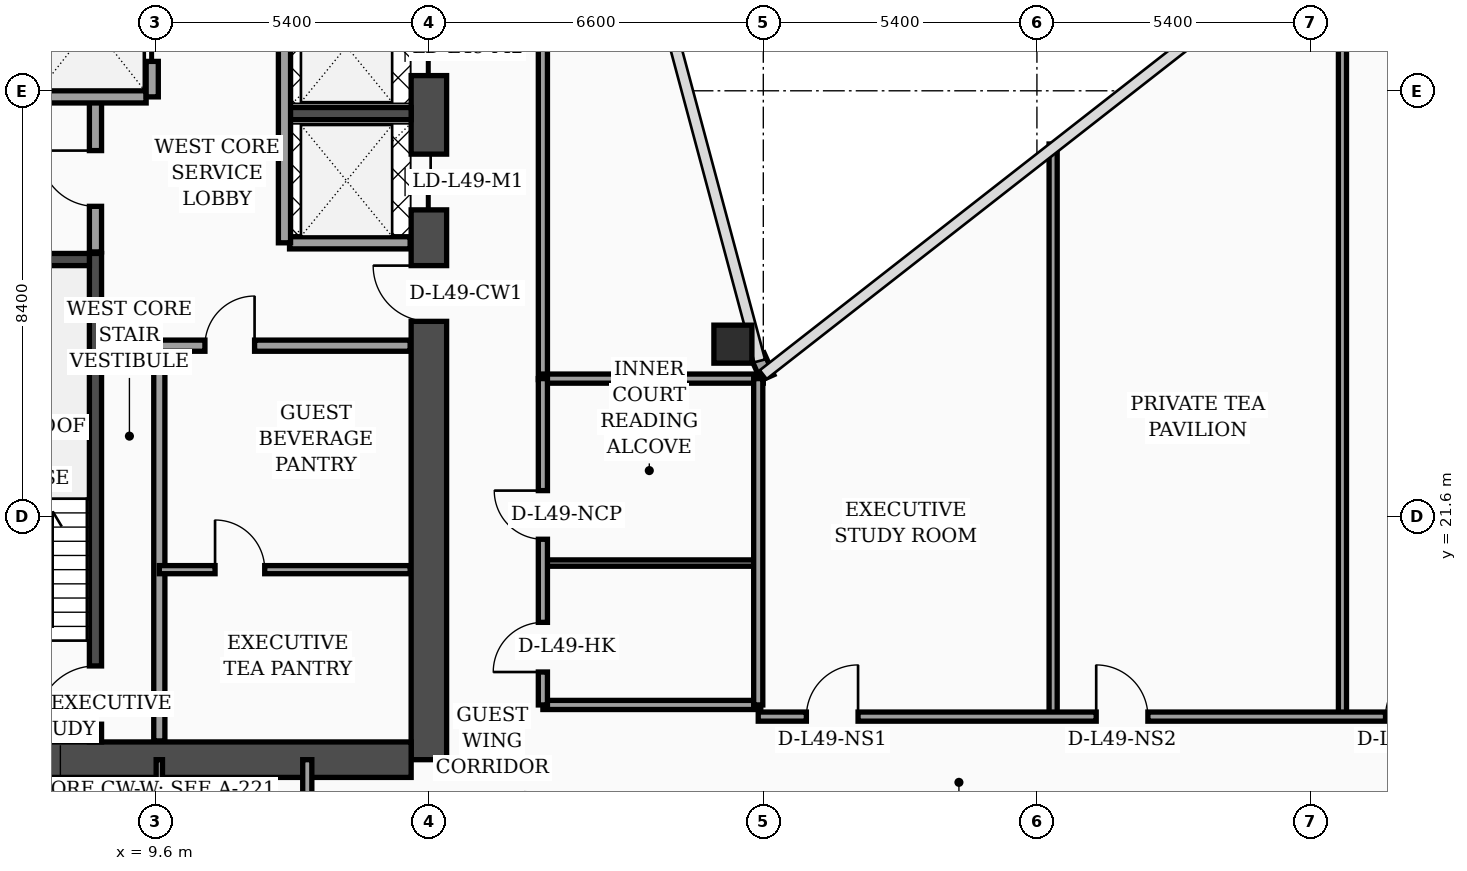
"""IFC4 building model, lengths in metres.
Left out: names, types, materials, properties, quantities, classifications, styles, units other than length and angle.
Written with IfcOpenShell. Run it as: python <this file> out.ifc"""

import sys

from ifc_helpers import new_model, si_unit, direction, frame, frame_2d, origin, origin_2d, place, context, subcontext, project, spatial, rectangle, hollow_rectangle, extrude, element, fill, save


model = new_model("IFC4")
c1 = context("Model", 3, precision=1e-05, world=origin(), true_north=direction((0.0, 1.0)))
c2 = subcontext(c1, "Body", "Model", "MODEL_VIEW")
j1 = project(units=[si_unit("LENGTHUNIT", "METRE"), si_unit("PLANEANGLEUNIT", "RADIAN")], contexts=[c1])
p1 = place(None, origin())
s1 = spatial("IfcSite", under=j1, at=p1, CompositionType="ELEMENT")
p2 = place(p1, origin())
s2 = spatial("IfcBuilding", under=s1, at=p2, CompositionType="ELEMENT")
p3 = place(p2, frame((0.0, 0.0, 199.6)))
s3 = spatial("IfcBuildingStorey", under=s2, at=p3, CompositionType="ELEMENT", Elevation=199.6)
p4 = place(p3, frame((15.0, 16.8, 0.0), z_axis=(0.0, 0.0, 1.0), x_axis=(0.0, 1.0, 0.0)))
e1 = element("IfcWall", 1, at=p4, inside=s3, PredefinedType="SHEAR", context=c2, shape_type="SweptSolid", body=[
    extrude(rectangle(XDim=21.6, YDim=0.7, at=frame_2d((10.8, 0.0))), origin(), (0.0, 0.0, 1.0), 3.56),
])
p5 = place(p4, frame((8.65, 0.0, 0.0)))
e2 = element("IfcOpeningElement", 2, at=p5, cuts=e1, PredefinedType="OPENING", context=c2, shape_type="SweptSolid", body=[
    extrude(rectangle(XDim=1.1, YDim=2.2, at=frame_2d((0.55, 1.1))), frame((0.0, 0.36, 0.0), z_axis=(0.0, -1.0, 0.0), x_axis=(1.0, 0.0, 0.0)), (0.0, 0.0, 1.0), 0.72),
])
p6 = place(p4, frame((10.85, 0.0, 0.0)))
e3 = element("IfcOpeningElement", 3, at=p6, cuts=e1, PredefinedType="OPENING", context=c2, shape_type="SweptSolid", body=[
    extrude(rectangle(XDim=1.1, YDim=2.2, at=frame_2d((0.55, 1.1))), frame((0.0, 0.36, 0.0), z_axis=(0.0, -1.0, 0.0), x_axis=(1.0, 0.0, 0.0)), (0.0, 0.0, 1.0), 0.72),
])
p7 = place(p4, frame((13.5, 0.0, 0.0)))
e4 = element("IfcOpeningElement", 4, at=p7, cuts=e1, PredefinedType="OPENING", context=c2, shape_type="SweptSolid", body=[
    extrude(rectangle(XDim=1.1, YDim=2.2, at=frame_2d((0.55, 1.1))), frame((0.0, 0.36, 0.0), z_axis=(0.0, -1.0, 0.0), x_axis=(1.0, 0.0, 0.0)), (0.0, 0.0, 1.0), 0.72),
])
p8 = place(p4, frame((16.15, 0.0, 0.0)))
e5 = element("IfcOpeningElement", 5, at=p8, cuts=e1, PredefinedType="OPENING", context=c2, shape_type="SweptSolid", body=[
    extrude(rectangle(XDim=1.1, YDim=2.2, at=frame_2d((0.55, 1.1))), frame((0.0, 0.36, 0.0), z_axis=(0.0, -1.0, 0.0), x_axis=(1.0, 0.0, 0.0)), (0.0, 0.0, 1.0), 0.72),
])
p9 = place(p3, frame((4.55, 16.8, 0.0), z_axis=(0.0, 0.0, 1.0), x_axis=(1.0, 0.0, 0.0)))
e6 = element("IfcWall", 6, at=p9, inside=s3, PredefinedType="SHEAR", context=c2, shape_type="SweptSolid", body=[
    extrude(rectangle(XDim=10.1, YDim=0.7, at=frame_2d((5.05, 0.0))), origin(), (0.0, 0.0, 1.0), 3.56),
])
p10 = place(p3, frame((8.42, 17.15, 0.0), z_axis=(0.0, 0.0, 1.0), x_axis=(0.0, 1.0, 0.0)))
e7 = element("IfcWall", 7, at=p10, inside=s3, PredefinedType="SOLIDWALL", context=c2, shape_type="SweptSolid", body=[
    extrude(rectangle(XDim=9.64, YDim=0.24, at=frame_2d((4.82, 0.0))), origin(), (0.0, 0.0, 1.0), 3.56),
])
p11 = place(p10, frame((0.35, 0.0, 0.0)))
e8 = element("IfcOpeningElement", 8, at=p11, cuts=e7, PredefinedType="OPENING", context=c2, shape_type="SweptSolid", body=[
    extrude(rectangle(XDim=1.15, YDim=2.2, at=frame_2d((0.575, 1.1))), frame((0.0, 0.13, 0.0), z_axis=(0.0, -1.0, 0.0), x_axis=(1.0, 0.0, 0.0)), (0.0, 0.0, 1.0), 0.26),
])
for number, where, z_axis, x_axis in (
    (9, (5.2, 17.58, 0.0), (0.0, 0.0, 1.0), (1.0, 0.0, 0.0)),
    (10, (5.2, 26.67, 0.0), (0.0, 0.0, 1.0), (1.0, 0.0, 0.0)),
):
    element("IfcWall", number, at=place(p3, frame(where, z_axis=z_axis, x_axis=x_axis)), inside=s3, PredefinedType="SOLIDWALL", context=c2, shape_type="SweptSolid", body=[
        extrude(rectangle(XDim=3.1, YDim=0.24, at=frame_2d((1.55, 0.0))), origin(), (0.0, 0.0, 1.0), 3.56),
    ])
p12 = place(p3, frame((12.18, 29.55, 0.0), z_axis=(0.0, 0.0, 1.0), x_axis=(1.0, 0.0, 0.0)))
e11 = element("IfcWall", 11, at=p12, inside=s3, PredefinedType="SOLIDWALL", context=c2, shape_type="SweptSolid", body=[
    extrude(rectangle(XDim=2.47, YDim=0.24, at=frame_2d((1.235, 0.0))), origin(), (0.0, 0.0, 1.0), 3.56),
])
p13 = place(p3, frame((21.0, 25.0, 0.0), z_axis=(0.0, 0.0, 1.0), x_axis=(1.0, 0.0, 0.0)))
e12 = element("IfcColumn", 12, at=p13, inside=s3, PredefinedType="COLUMN", context=c2, shape_type="SweptSolid", body=[
    extrude(hollow_rectangle(XDim=0.75, YDim=0.75, WallThickness=0.032, at=origin_2d()), origin(), (0.0, 0.0, 1.0), 3.56),
])
p14 = place(p3, frame((21.68, 24.34, 0.0), z_axis=(0.0, 0.0, 1.0), x_axis=(-0.40758134973, 0.913168901875, 0.0)))
e13 = element("IfcWall", 13, at=p14, inside=s3, PredefinedType="SOLIDWALL", context=c2, shape_type="SweptSolid", body=[
    extrude(rectangle(XDim=0.471, YDim=0.28, at=frame_2d((0.235, 0.0))), origin(), (0.0, 0.0, 1.0), 3.56),
])
p15 = place(p3, frame((8.42, 26.82, 0.0), z_axis=(0.0, 0.0, 1.0), x_axis=(0.0, 1.0, 0.0)))
e14 = element("IfcWall", 14, at=p15, inside=s3, PredefinedType="SOLIDWALL", context=c2, shape_type="SweptSolid", body=[
    extrude(rectangle(XDim=3.0, YDim=0.24, at=frame_2d((1.5, 0.0))), origin(), (0.0, 0.0, 1.0), 3.56),
])
p16 = place(p15, frame((0.9, 0.0, 0.0)))
e15 = element("IfcOpeningElement", 15, at=p16, cuts=e14, PredefinedType="OPENING", context=c2, shape_type="SweptSolid", body=[
    extrude(rectangle(XDim=1.1, YDim=2.2, at=frame_2d((0.55, 1.1))), frame((0.0, 0.13, 0.0), z_axis=(0.0, -1.0, 0.0), x_axis=(1.0, 0.0, 0.0)), (0.0, 0.0, 1.0), 0.26),
])
p17 = place(p3, frame((4.57, 29.88, 0.0), z_axis=(0.0, 0.0, 1.0), x_axis=(1.0, 0.0, 0.0)))
e16 = element("IfcWall", 16, at=p17, inside=s3, PredefinedType="SOLIDWALL", context=c2, shape_type="SweptSolid", body=[
    extrude(rectangle(XDim=4.85, YDim=0.24, at=frame_2d((2.425, 0.0))), origin(), (0.0, 0.0, 1.0), 3.56),
])
p18 = place(p17, frame((0.45, 0.0, 0.0)))
e17 = element("IfcOpeningElement", 17, at=p18, cuts=e16, PredefinedType="OPENING", context=c2, shape_type="SweptSolid", body=[
    extrude(rectangle(XDim=1.3, YDim=2.35, at=frame_2d((0.65, 1.175))), frame((0.0, 0.13, 0.0), z_axis=(0.0, -1.0, 0.0), x_axis=(1.0, 0.0, 0.0)), (0.0, 0.0, 1.0), 0.26),
])
p19 = place(p3, frame((9.54, 29.88, 0.0), z_axis=(0.0, 0.0, 1.0), x_axis=(0.0, 1.0, 0.0)))
e18 = element("IfcWall", 18, at=p19, inside=s3, PredefinedType="SOLIDWALL", context=c2, shape_type="SweptSolid", body=[
    extrude(rectangle(XDim=2.9, YDim=0.24, at=frame_2d((1.45, 0.0))), origin(), (0.0, 0.0, 1.0), 3.56),
])
p20 = place(p19, frame((0.7, 0.0, 0.0)))
e19 = element("IfcOpeningElement", 19, at=p20, cuts=e18, PredefinedType="OPENING", context=c2, shape_type="SweptSolid", body=[
    extrude(rectangle(XDim=1.3, YDim=2.35, at=frame_2d((0.65, 1.175))), frame((0.0, 0.13, 0.0), z_axis=(0.0, -1.0, 0.0), x_axis=(1.0, 0.0, 0.0)), (0.0, 0.0, 1.0), 0.26),
])
p21 = place(p3, frame((9.68, 17.17, 0.0), z_axis=(0.0, 0.0, 1.0), x_axis=(0.0, 1.0, 0.0)))
e20 = element("IfcWall", 20, at=p21, inside=s3, PredefinedType="SOLIDWALL", context=c2, shape_type="SweptSolid", body=[
    extrude(rectangle(XDim=7.83, YDim=0.22, at=frame_2d((3.915, 0.0))), origin(), (0.0, 0.0, 1.0), 3.56),
])
p22 = place(p3, frame((9.68, 20.55, 0.0), z_axis=(0.0, 0.0, 1.0), x_axis=(1.0, 0.0, 0.0)))
e21 = element("IfcWall", 21, at=p22, inside=s3, PredefinedType="PARTITIONING", context=c2, shape_type="SweptSolid", body=[
    extrude(rectangle(XDim=4.95, YDim=0.16, at=frame_2d((2.475, 0.0))), origin(), (0.0, 0.0, 1.0), 3.56),
])
p23 = place(p22, frame((1.1, 0.0, 0.0)))
e22 = element("IfcOpeningElement", 22, at=p23, cuts=e21, PredefinedType="OPENING", context=c2, shape_type="SweptSolid", body=[
    extrude(rectangle(XDim=0.98, YDim=2.15, at=frame_2d((0.49, 1.075))), frame((0.0, 0.09, 0.0), z_axis=(0.0, -1.0, 0.0), x_axis=(1.0, 0.0, 0.0)), (0.0, 0.0, 1.0), 0.18),
])
p24 = place(p3, frame((9.68, 24.97, 0.0), z_axis=(0.0, 0.0, 1.0), x_axis=(1.0, 0.0, 0.0)))
e23 = element("IfcWall", 23, at=p24, inside=s3, PredefinedType="SOLIDWALL", context=c2, shape_type="SweptSolid", body=[
    extrude(rectangle(XDim=4.95, YDim=0.22, at=frame_2d((2.475, 0.0))), origin(), (0.0, 0.0, 1.0), 2.94),
])
p25 = place(p24, frame((0.9, 0.0, 0.0)))
e24 = element("IfcOpeningElement", 24, at=p25, cuts=e23, PredefinedType="OPENING", context=c2, shape_type="SweptSolid", body=[
    extrude(rectangle(XDim=0.98, YDim=2.15, at=frame_2d((0.49, 1.075))), frame((0.0, 0.12, 0.0), z_axis=(0.0, -1.0, 0.0), x_axis=(1.0, 0.0, 0.0)), (0.0, 0.0, 1.0), 0.24),
])
p26 = place(p3, frame((12.25, 27.0, 0.0), z_axis=(0.0, 0.0, 1.0), x_axis=(1.0, 0.0, 0.0)))
e25 = element("IfcWall", 25, at=p26, inside=s3, PredefinedType="SOLIDWALL", context=c2, shape_type="SweptSolid", body=[
    extrude(rectangle(XDim=2.38, YDim=0.24, at=frame_2d((1.19, 0.0))), origin(), (0.0, 0.0, 1.0), 3.56),
])
p27 = place(p3, frame((12.15, 27.0, 0.0), z_axis=(0.0, 0.0, 1.0), x_axis=(0.0, 1.0, 0.0)))
e26 = element("IfcWall", 26, at=p27, inside=s3, PredefinedType="SOLIDWALL", context=c2, shape_type="SweptSolid", body=[
    extrude(rectangle(XDim=7.75, YDim=0.24, at=frame_2d((3.875, 0.0))), origin(), (0.0, 0.0, 1.0), 3.56),
])
p28 = place(p3, frame((9.68, 14.75, 0.0), z_axis=(0.0, 0.0, 1.0), x_axis=(0.0, 1.0, 0.0)))
e27 = element("IfcWall", 27, at=p28, inside=s3, PredefinedType="PARTITIONING", context=c2, shape_type="SweptSolid", body=[
    extrude(rectangle(XDim=2.05, YDim=0.125, at=frame_2d((1.025, 0.0))), origin(), (0.0, 0.0, 1.0), 3.56),
])
p29 = place(p3, frame((12.6, 2.44, 0.0), z_axis=(0.0, 0.0, 1.0), x_axis=(0.0, 1.0, 0.0)))
e28 = element("IfcWall", 28, at=p29, inside=s3, PredefinedType="PARTITIONING", context=c2, shape_type="SweptSolid", body=[
    extrude(rectangle(XDim=14.36, YDim=0.18, at=frame_2d((7.18, 0.0))), origin(), (0.0, 0.0, 1.0), 2.94),
])
p30 = place(p29, frame((3.01, 0.0, 0.0)))
e29 = element("IfcOpeningElement", 29, at=p30, cuts=e28, PredefinedType="OPENING", context=c2, shape_type="SweptSolid", body=[
    extrude(rectangle(XDim=1.02, YDim=2.2, at=frame_2d((0.51, 1.1))), frame((0.0, 0.1, 0.0), z_axis=(0.0, -1.0, 0.0), x_axis=(1.0, 0.0, 0.0)), (0.0, 0.0, 1.0), 0.2),
])
p31 = place(p29, frame((9.52, 0.0, 0.0)))
e30 = element("IfcOpeningElement", 30, at=p31, cuts=e28, PredefinedType="OPENING", context=c2, shape_type="SweptSolid", body=[
    extrude(rectangle(XDim=1.02, YDim=2.2, at=frame_2d((0.51, 1.1))), frame((0.0, 0.1, 0.0), z_axis=(0.0, -1.0, 0.0), x_axis=(1.0, 0.0, 0.0)), (0.0, 0.0, 1.0), 0.2),
])
p32 = place(p3, frame((17.25, 24.3, 0.0), z_axis=(0.0, 0.0, 1.0), x_axis=(0.0, 1.0, 0.0)))
e31 = element("IfcWall", 31, at=p32, inside=s3, PredefinedType="PARTITIONING", context=c2, shape_type="SweptSolid", body=[
    extrude(rectangle(XDim=18.15, YDim=0.18, at=frame_2d((9.075, 0.0))), origin(), (0.0, 0.0, 1.0), 2.94),
])
p33 = place(p3, frame((17.25, 17.88, 0.0), z_axis=(0.0, 0.0, 1.0), x_axis=(1.0, 0.0, 0.0)))
e32 = element("IfcWall", 32, at=p33, inside=s3, PredefinedType="PARTITIONING", context=c2, shape_type="SweptSolid", body=[
    extrude(rectangle(XDim=4.3, YDim=0.18, at=frame_2d((2.15, 0.0))), origin(), (0.0, 0.0, 1.0), 3.09),
])
p34 = place(p3, frame((17.25, 20.68, 0.0), z_axis=(0.0, 0.0, 1.0), x_axis=(1.0, 0.0, 0.0)))
e33 = element("IfcWall", 33, at=p34, inside=s3, PredefinedType="PARTITIONING", context=c2, shape_type="SweptSolid", body=[
    extrude(rectangle(XDim=4.3, YDim=0.125, at=frame_2d((2.15, 0.0))), origin(), (0.0, 0.0, 1.0), 3.56),
])
p35 = place(p3, frame((17.25, 24.32, 0.0), z_axis=(0.0, 0.0, 1.0), x_axis=(1.0, 0.0, 0.0)))
e34 = element("IfcWall", 34, at=p35, inside=s3, PredefinedType="PARTITIONING", context=c2, shape_type="SweptSolid", body=[
    extrude(rectangle(XDim=4.35, YDim=0.18, at=frame_2d((2.175, 0.0))), origin(), (0.0, 0.0, 1.0), 3.56),
])
p36 = place(p3, frame((21.5, 17.88, 0.0), z_axis=(0.0, 0.0, 1.0), x_axis=(0.0, 1.0, 0.0)))
e35 = element("IfcWall", 35, at=p36, inside=s3, PredefinedType="PARTITIONING", context=c2, shape_type="SweptSolid", body=[
    extrude(rectangle(XDim=6.44, YDim=0.18, at=frame_2d((3.22, 0.0))), origin(), (0.0, 0.0, 1.0), 3.09),
])
p37 = place(p3, frame((17.25, 17.88, 0.0), z_axis=(0.0, 0.0, 1.0), x_axis=(0.0, 1.0, 0.0)))
e36 = element("IfcWall", 36, at=p37, inside=s3, PredefinedType="PARTITIONING", context=c2, shape_type="SweptSolid", body=[
    extrude(rectangle(XDim=6.44, YDim=0.18, at=frame_2d((3.22, 0.0))), origin(), (0.0, 0.0, 1.0), 3.09),
])
p38 = place(p37, frame((0.65, 0.0, 0.0)))
e37 = element("IfcOpeningElement", 37, at=p38, cuts=e36, PredefinedType="OPENING", context=c2, shape_type="SweptSolid", body=[
    extrude(rectangle(XDim=0.98, YDim=2.15, at=frame_2d((0.49, 1.075))), frame((0.0, 0.1, 0.0), z_axis=(0.0, -1.0, 0.0), x_axis=(1.0, 0.0, 0.0)), (0.0, 0.0, 1.0), 0.2),
])
p39 = place(p37, frame((3.27, 0.0, 0.0)))
e38 = element("IfcOpeningElement", 38, at=p39, cuts=e36, PredefinedType="OPENING", context=c2, shape_type="SweptSolid", body=[
    extrude(rectangle(XDim=0.96, YDim=2.2, at=frame_2d((0.48, 1.1))), frame((0.0, 0.1, 0.0), z_axis=(0.0, -1.0, 0.0), x_axis=(1.0, 0.0, 0.0)), (0.0, 0.0, 1.0), 0.2),
])
p40 = place(p3, frame((27.32, 17.65, 0.0), z_axis=(0.0, 0.0, 1.0), x_axis=(0.0, 1.0, 0.0)))
e39 = element("IfcWall", 39, at=p40, inside=s3, PredefinedType="PARTITIONING", context=c2, shape_type="SweptSolid", body=[
    extrude(rectangle(XDim=11.3, YDim=0.16, at=frame_2d((5.65, 0.0))), origin(), (0.0, 0.0, 1.0), 2.94),
])
p41 = place(p3, frame((33.03, 17.65, 0.0), z_axis=(0.0, 0.0, 1.0), x_axis=(0.0, 1.0, 0.0)))
e40 = element("IfcWall", 40, at=p41, inside=s3, PredefinedType="PARTITIONING", context=c2, shape_type="SweptSolid", body=[
    extrude(rectangle(XDim=15.76, YDim=0.16, at=frame_2d((7.88, 0.0))), origin(), (0.0, 0.0, 1.0), 2.94),
])
p42 = place(p3, frame((21.5, 17.65, 0.0), z_axis=(0.0, 0.0, 1.0), x_axis=(1.0, 0.0, 0.0)))
e41 = element("IfcWall", 41, at=p42, inside=s3, PredefinedType="PARTITIONING", context=c2, shape_type="SweptSolid", body=[
    extrude(rectangle(XDim=17.25, YDim=0.18, at=frame_2d((8.625, 0.0))), origin(), (0.0, 0.0, 1.0), 2.94),
])
p43 = place(p42, frame((0.95, 0.0, 0.0)))
e42 = element("IfcOpeningElement", 42, at=p43, cuts=e41, PredefinedType="OPENING", context=c2, shape_type="SweptSolid", body=[
    extrude(rectangle(XDim=1.02, YDim=2.2, at=frame_2d((0.51, 1.1))), frame((0.0, 0.1, 0.0), z_axis=(0.0, -1.0, 0.0), x_axis=(1.0, 0.0, 0.0)), (0.0, 0.0, 1.0), 0.2),
])
p44 = place(p42, frame((6.67, 0.0, 0.0)))
e43 = element("IfcOpeningElement", 43, at=p44, cuts=e41, PredefinedType="OPENING", context=c2, shape_type="SweptSolid", body=[
    extrude(rectangle(XDim=1.02, YDim=2.2, at=frame_2d((0.51, 1.1))), frame((0.0, 0.1, 0.0), z_axis=(0.0, -1.0, 0.0), x_axis=(1.0, 0.0, 0.0)), (0.0, 0.0, 1.0), 0.2),
])
p45 = place(p42, frame((12.38, 0.0, 0.0)))
e44 = element("IfcOpeningElement", 44, at=p45, cuts=e41, PredefinedType="OPENING", context=c2, shape_type="SweptSolid", body=[
    extrude(rectangle(XDim=1.02, YDim=2.2, at=frame_2d((0.51, 1.1))), frame((0.0, 0.1, 0.0), z_axis=(0.0, -1.0, 0.0), x_axis=(1.0, 0.0, 0.0)), (0.0, 0.0, 1.0), 0.2),
])
p46 = place(p16, origin())
e45 = element("IfcDoor", 45, at=p46, inside=s3, OperationType="SINGLE_SWING_RIGHT", PredefinedType="DOOR", context=c2, shape_type="SweptSolid", body=[
    extrude(rectangle(XDim=1.1, YDim=2.2, at=frame_2d((0.55, 1.1))), frame((0.0, 0.025, 0.0), z_axis=(0.0, -1.0, 0.0), x_axis=(1.0, 0.0, 0.0)), (0.0, 0.0, 1.0), 0.05),
])
fill(e15, e45)
p47 = place(p20, origin())
e46 = element("IfcDoor", 46, at=p47, inside=s3, OperationType="DOUBLE_DOOR_SLIDING", PredefinedType="DOOR", context=c2, shape_type="SweptSolid", body=[
    extrude(rectangle(XDim=1.3, YDim=2.35, at=frame_2d((0.65, 1.175))), frame((0.0, 0.025, 0.0), z_axis=(0.0, -1.0, 0.0), x_axis=(1.0, 0.0, 0.0)), (0.0, 0.0, 1.0), 0.05),
])
fill(e19, e46)
p48 = place(p23, origin())
e47 = element("IfcDoor", 47, at=p48, inside=s3, OperationType="SINGLE_SWING_LEFT", PredefinedType="DOOR", context=c2, shape_type="SweptSolid", body=[
    extrude(rectangle(XDim=0.98, YDim=2.15, at=frame_2d((0.49, 1.075))), frame((0.0, 0.025, 0.0), z_axis=(0.0, -1.0, 0.0), x_axis=(1.0, 0.0, 0.0)), (0.0, 0.0, 1.0), 0.05),
])
fill(e22, e47)
p49 = place(p25, origin())
e48 = element("IfcDoor", 48, at=p49, inside=s3, OperationType="SINGLE_SWING_RIGHT", PredefinedType="DOOR", context=c2, shape_type="SweptSolid", body=[
    extrude(rectangle(XDim=0.98, YDim=2.15, at=frame_2d((0.49, 1.075))), frame((0.0, 0.025, 0.0), z_axis=(0.0, -1.0, 0.0), x_axis=(1.0, 0.0, 0.0)), (0.0, 0.0, 1.0), 0.05),
])
fill(e24, e48)
p50 = place(p38, origin())
e49 = element("IfcDoor", 49, at=p50, inside=s3, OperationType="SINGLE_SWING_LEFT", PredefinedType="DOOR", context=c2, shape_type="SweptSolid", body=[
    extrude(rectangle(XDim=0.98, YDim=2.15, at=frame_2d((0.49, 1.075))), frame((0.0, 0.025, 0.0), z_axis=(0.0, -1.0, 0.0), x_axis=(1.0, 0.0, 0.0)), (0.0, 0.0, 1.0), 0.05),
])
fill(e37, e49)
p51 = place(p39, origin())
e50 = element("IfcDoor", 50, at=p51, inside=s3, OperationType="SINGLE_SWING_RIGHT", PredefinedType="DOOR", context=c2, shape_type="SweptSolid", body=[
    extrude(rectangle(XDim=0.96, YDim=2.2, at=frame_2d((0.48, 1.1))), frame((0.0, 0.025, 0.0), z_axis=(0.0, -1.0, 0.0), x_axis=(1.0, 0.0, 0.0)), (0.0, 0.0, 1.0), 0.05),
])
fill(e38, e50)
p52 = place(p43, origin())
e51 = element("IfcDoor", 51, at=p52, inside=s3, OperationType="SINGLE_SWING_RIGHT", PredefinedType="DOOR", context=c2, shape_type="SweptSolid", body=[
    extrude(rectangle(XDim=1.02, YDim=2.2, at=frame_2d((0.51, 1.1))), frame((0.0, 0.025, 0.0), z_axis=(0.0, -1.0, 0.0), x_axis=(1.0, 0.0, 0.0)), (0.0, 0.0, 1.0), 0.05),
])
fill(e42, e51)
p53 = place(p44, origin())
e52 = element("IfcDoor", 52, at=p53, inside=s3, OperationType="SINGLE_SWING_LEFT", PredefinedType="DOOR", context=c2, shape_type="SweptSolid", body=[
    extrude(rectangle(XDim=1.02, YDim=2.2, at=frame_2d((0.51, 1.1))), frame((0.0, 0.025, 0.0), z_axis=(0.0, -1.0, 0.0), x_axis=(1.0, 0.0, 0.0)), (0.0, 0.0, 1.0), 0.05),
])
fill(e43, e52)
p54 = place(p45, origin())
e53 = element("IfcDoor", 53, at=p54, inside=s3, OperationType="SINGLE_SWING_RIGHT", PredefinedType="DOOR", context=c2, shape_type="SweptSolid", body=[
    extrude(rectangle(XDim=1.02, YDim=2.2, at=frame_2d((0.51, 1.1))), frame((0.0, 0.025, 0.0), z_axis=(0.0, -1.0, 0.0), x_axis=(1.0, 0.0, 0.0)), (0.0, 0.0, 1.0), 0.05),
])
fill(e44, e53)
p55 = place(p11, origin())
e54 = element("IfcDoor", 54, at=p55, inside=s3, OperationType="SINGLE_SWING_LEFT", PredefinedType="DOOR", context=c2, shape_type="SweptSolid", body=[
    extrude(rectangle(XDim=1.15, YDim=2.2, at=frame_2d((0.575, 1.1))), frame((0.0, 0.025, 0.0), z_axis=(0.0, -1.0, 0.0), x_axis=(1.0, 0.0, 0.0)), (0.0, 0.0, 1.0), 0.05),
])
fill(e8, e54)
p56 = place(p5, origin())
e55 = element("IfcDoor", 55, at=p56, inside=s3, OperationType="SINGLE_SWING_RIGHT", PredefinedType="DOOR", context=c2, shape_type="SweptSolid", body=[
    extrude(rectangle(XDim=1.1, YDim=2.2, at=frame_2d((0.55, 1.1))), frame((0.0, 0.025, 0.0), z_axis=(0.0, -1.0, 0.0), x_axis=(1.0, 0.0, 0.0)), (0.0, 0.0, 1.0), 0.05),
])
fill(e2, e55)
p57 = place(p6, origin())
e56 = element("IfcDoor", 56, at=p57, inside=s3, OperationType="DOUBLE_DOOR_SLIDING", PredefinedType="DOOR", context=c2, shape_type="SweptSolid", body=[
    extrude(rectangle(XDim=1.1, YDim=2.2, at=frame_2d((0.55, 1.1))), frame((0.0, 0.025, 0.0), z_axis=(0.0, -1.0, 0.0), x_axis=(1.0, 0.0, 0.0)), (0.0, 0.0, 1.0), 0.05),
])
fill(e3, e56)
p58 = place(p7, origin())
e57 = element("IfcDoor", 57, at=p58, inside=s3, OperationType="DOUBLE_DOOR_SLIDING", PredefinedType="DOOR", context=c2, shape_type="SweptSolid", body=[
    extrude(rectangle(XDim=1.1, YDim=2.2, at=frame_2d((0.55, 1.1))), frame((0.0, 0.025, 0.0), z_axis=(0.0, -1.0, 0.0), x_axis=(1.0, 0.0, 0.0)), (0.0, 0.0, 1.0), 0.05),
])
fill(e4, e57)
save(model, sys.argv[1])
